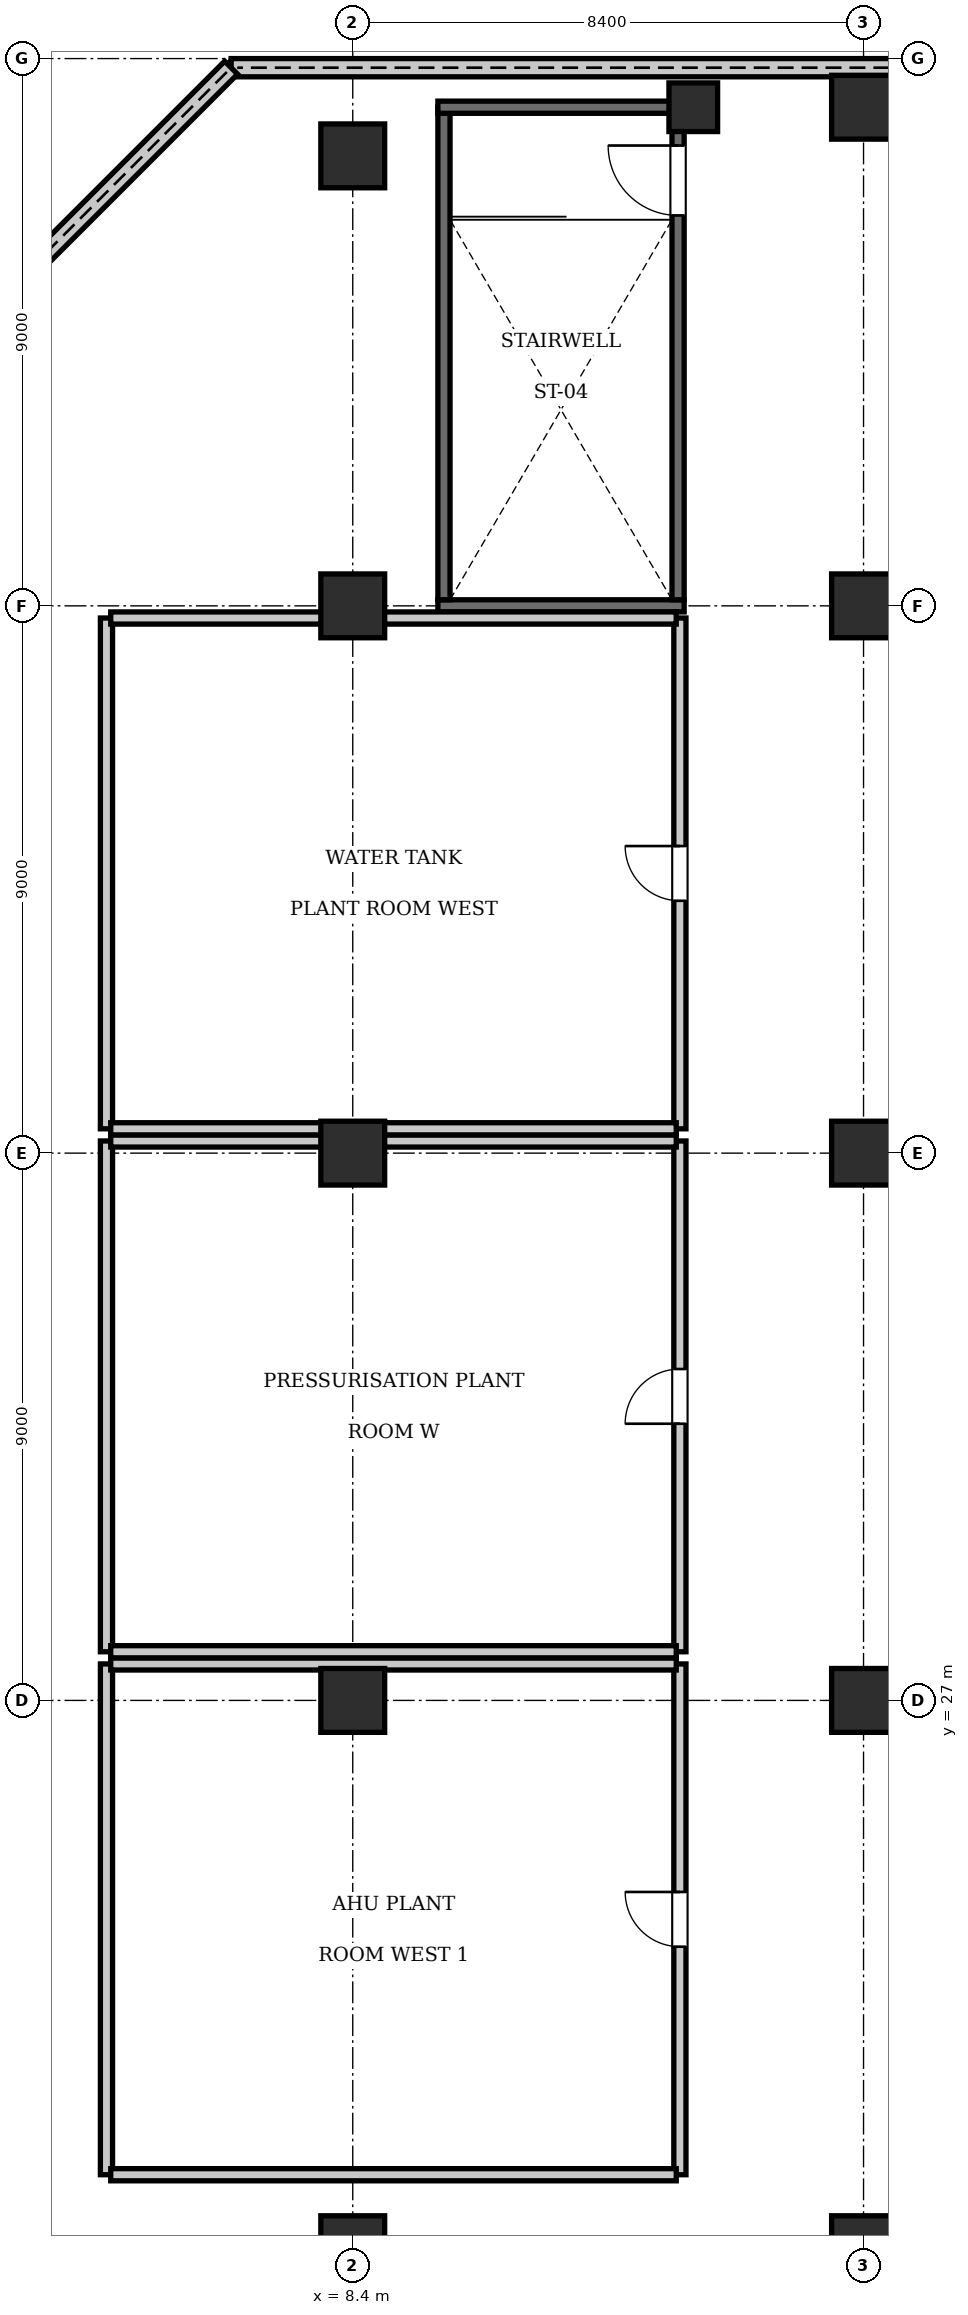
"""IFC4 building model, lengths in metres.
Left out: names, types, materials, properties, quantities, classifications, styles, units other than length and angle.
Written with IfcOpenShell. Run it as: python <this file> out.ifc"""

import sys

from ifc_helpers import new_model, si_unit, direction, frame, frame_2d, origin, origin_2d, place, context, subcontext, project, spatial, rectangle, extrude, element, fill, save


model = new_model("IFC4")
c1 = context("Model", 3, precision=1e-05, world=origin(), true_north=direction((0.0, 1.0)))
c2 = subcontext(c1, "Body", "Model", "MODEL_VIEW")
j1 = project(units=[si_unit("LENGTHUNIT", "METRE"), si_unit("PLANEANGLEUNIT", "RADIAN")], contexts=[c1])
p1 = place(None, origin())
s1 = spatial("IfcSite", under=j1, at=p1, CompositionType="ELEMENT")
p2 = place(p1, origin())
s2 = spatial("IfcBuilding", under=s1, at=p2, CompositionType="ELEMENT")
p3 = place(p2, frame((0.0, 0.0, 21.35)))
s3 = spatial("IfcBuildingStorey", under=s2, at=p3, CompositionType="ELEMENT", Elevation=21.35)
for number, where, z_axis, x_axis in (
    (1, (16.8, 18.0, 0.0), (0.0, 0.0, 1.0), (1.0, 0.0, 0.0)),
    (2, (16.8, 27.0, 0.0), (0.0, 0.0, 1.0), (1.0, 0.0, 0.0)),
    (3, (16.8, 36.0, 0.0), (0.0, 0.0, 1.0), (1.0, 0.0, 0.0)),
    (4, (16.8, 45.0, 0.0), (0.0, 0.0, 1.0), (1.0, 0.0, 0.0)),
    (5, (8.4, 18.0, 0.0), (0.0, 0.0, 1.0), (1.0, 0.0, 0.0)),
    (6, (8.4, 27.0, 0.0), (0.0, 0.0, 1.0), (1.0, 0.0, 0.0)),
    (7, (8.4, 36.0, 0.0), (0.0, 0.0, 1.0), (1.0, 0.0, 0.0)),
    (8, (8.4, 45.0, 0.0), (0.0, 0.0, 1.0), (1.0, 0.0, 0.0)),
    (9, (8.4, 52.4, 0.0), (0.0, 0.0, 1.0), (1.0, 0.0, 0.0)),
    (10, (16.8, 53.2, 0.0), (0.0, 0.0, 1.0), (1.0, 0.0, 0.0)),
):
    element("IfcColumn", number, at=place(p3, frame(where, z_axis=z_axis, x_axis=x_axis)), inside=s3, PredefinedType="COLUMN", context=c2, shape_type="SweptSolid", body=[
        extrude(rectangle(XDim=1.05, YDim=1.05, at=origin_2d()), origin(), (0.0, 0.0, 1.0), 5.6),
    ])
p4 = place(p3, frame((14.0, 53.2, 0.0), z_axis=(0.0, 0.0, 1.0), x_axis=(1.0, 0.0, 0.0)))
e11 = element("IfcColumn", 11, at=p4, inside=s3, PredefinedType="PILASTER", context=c2, shape_type="SweptSolid", body=[
    extrude(rectangle(XDim=0.8, YDim=0.8, at=origin_2d()), origin(), (0.0, 0.0, 1.0), 5.6),
])
p5 = place(p3, frame((9.8, 45.0, 0.0), z_axis=(0.0, 0.0, 1.0), x_axis=(1.0, 0.0, 0.0)))
e12 = element("IfcWall", 12, at=p5, inside=s3, PredefinedType="SOLIDWALL", context=c2, shape_type="SweptSolid", body=[
    extrude(rectangle(XDim=4.05, YDim=0.2, at=frame_2d((2.025, 0.0))), origin(), (0.0, 0.0, 1.0), 3.76),
])
p6 = place(p3, frame((9.9, 45.1, 0.0), z_axis=(0.0, 0.0, 1.0), x_axis=(0.0, 1.0, 0.0)))
e13 = element("IfcWall", 13, at=p6, inside=s3, PredefinedType="SOLIDWALL", context=c2, shape_type="SweptSolid", body=[
    extrude(rectangle(XDim=8.1, YDim=0.2, at=frame_2d((4.05, 0.0))), origin(), (0.0, 0.0, 1.0), 5.36),
])
p7 = place(p3, frame((13.75, 45.1, 0.0), z_axis=(0.0, 0.0, 1.0), x_axis=(0.0, 1.0, 0.0)))
e14 = element("IfcWall", 14, at=p7, inside=s3, PredefinedType="SOLIDWALL", context=c2, shape_type="SweptSolid", body=[
    extrude(rectangle(XDim=8.1, YDim=0.2, at=frame_2d((4.05, 0.0))), origin(), (0.0, 0.0, 1.0), 5.36),
])
p8 = place(p7, frame((6.32, 0.0, 0.0)))
e15 = element("IfcOpeningElement", 15, at=p8, cuts=e14, PredefinedType="OPENING", context=c2, shape_type="SweptSolid", body=[
    extrude(rectangle(XDim=1.15, YDim=2.15, at=frame_2d((0.575, 1.075))), frame((0.0, 0.11, 0.0), z_axis=(0.0, -1.0, 0.0), x_axis=(1.0, 0.0, 0.0)), (0.0, 0.0, 1.0), 0.22),
])
p9 = place(p3, frame((9.8, 53.2, 0.0), z_axis=(0.0, 0.0, 1.0), x_axis=(1.0, 0.0, 0.0)))
e16 = element("IfcWall", 16, at=p9, inside=s3, PredefinedType="SOLIDWALL", context=c2, shape_type="SweptSolid", body=[
    extrude(rectangle(XDim=4.05, YDim=0.2, at=frame_2d((2.025, 0.0))), origin(), (0.0, 0.0, 1.0), 5.36),
])
p10 = place(p3, frame((25.2, 53.85, 0.0), z_axis=(0.0, 0.0, 1.0), x_axis=(-1.0, 0.0, 0.0)))
e17 = element("IfcWall", 17, at=p10, inside=s3, PredefinedType="SOLIDWALL", context=c2, shape_type="SweptSolid", body=[
    extrude(rectangle(XDim=18.8, YDim=0.3, at=frame_2d((9.4, 0.0))), origin(), (0.0, 0.0, 1.0), 1.8),
])
p11 = place(p3, frame((6.4, 53.85, 0.0), z_axis=(0.0, 0.0, 1.0), x_axis=(-0.707106781187, -0.707106781187, 0.0)))
e18 = element("IfcWall", 18, at=p11, inside=s3, PredefinedType="SOLIDWALL", context=c2, shape_type="SweptSolid", body=[
    extrude(rectangle(XDim=8.839, YDim=0.3, at=frame_2d((4.419, 0.0))), origin(), (0.0, 0.0, 1.0), 1.8),
])
p12 = place(p3, frame((13.78, 19.2, 0.0), z_axis=(0.0, 0.0, 1.0), x_axis=(0.0, 1.0, 0.0)))
e19 = element("IfcWall", 19, at=p12, inside=s3, PredefinedType="PARTITIONING", context=c2, shape_type="SweptSolid", body=[
    extrude(rectangle(XDim=8.4, YDim=0.2, at=frame_2d((4.2, 0.0))), origin(), (0.0, 0.0, 1.0), 5.36),
])
p13 = place(p12, frame((3.75, 0.0, 0.0)))
e20 = element("IfcOpeningElement", 20, at=p13, cuts=e19, PredefinedType="OPENING", context=c2, shape_type="SweptSolid", body=[
    extrude(rectangle(XDim=0.9, YDim=2.1, at=frame_2d((0.45, 1.05))), frame((0.0, 0.11, 0.0), z_axis=(0.0, -1.0, 0.0), x_axis=(1.0, 0.0, 0.0)), (0.0, 0.0, 1.0), 0.22),
])
p14 = place(p3, frame((4.35, 19.2, 0.0), z_axis=(0.0, 0.0, 1.0), x_axis=(0.0, 1.0, 0.0)))
e21 = element("IfcWall", 21, at=p14, inside=s3, PredefinedType="PARTITIONING", context=c2, shape_type="SweptSolid", body=[
    extrude(rectangle(XDim=8.4, YDim=0.2, at=frame_2d((4.2, 0.0))), origin(), (0.0, 0.0, 1.0), 5.36),
])
for number, where, z_axis, x_axis in (
    (22, (4.42, 19.2, 0.0), (0.0, 0.0, 1.0), (1.0, 0.0, 0.0)),
    (23, (4.42, 27.6, 0.0), (0.0, 0.0, 1.0), (1.0, 0.0, 0.0)),
):
    element("IfcWall", number, at=place(p3, frame(where, z_axis=z_axis, x_axis=x_axis)), inside=s3, PredefinedType="PARTITIONING", context=c2, shape_type="SweptSolid", body=[
        extrude(rectangle(XDim=9.3, YDim=0.2, at=frame_2d((4.65, 0.0))), origin(), (0.0, 0.0, 1.0), 5.36),
    ])
p15 = place(p3, frame((13.78, 27.8, 0.0), z_axis=(0.0, 0.0, 1.0), x_axis=(0.0, 1.0, 0.0)))
e24 = element("IfcWall", 24, at=p15, inside=s3, PredefinedType="PARTITIONING", context=c2, shape_type="SweptSolid", body=[
    extrude(rectangle(XDim=8.4, YDim=0.2, at=frame_2d((4.2, 0.0))), origin(), (0.0, 0.0, 1.0), 5.36),
])
p16 = place(p15, frame((3.75, 0.0, 0.0)))
e25 = element("IfcOpeningElement", 25, at=p16, cuts=e24, PredefinedType="OPENING", context=c2, shape_type="SweptSolid", body=[
    extrude(rectangle(XDim=0.9, YDim=2.1, at=frame_2d((0.45, 1.05))), frame((0.0, 0.11, 0.0), z_axis=(0.0, -1.0, 0.0), x_axis=(1.0, 0.0, 0.0)), (0.0, 0.0, 1.0), 0.22),
])
p17 = place(p3, frame((4.35, 27.8, 0.0), z_axis=(0.0, 0.0, 1.0), x_axis=(0.0, 1.0, 0.0)))
e26 = element("IfcWall", 26, at=p17, inside=s3, PredefinedType="PARTITIONING", context=c2, shape_type="SweptSolid", body=[
    extrude(rectangle(XDim=8.4, YDim=0.2, at=frame_2d((4.2, 0.0))), origin(), (0.0, 0.0, 1.0), 5.36),
])
p18 = place(p3, frame((4.42, 27.8, 0.0), z_axis=(0.0, 0.0, 1.0), x_axis=(1.0, 0.0, 0.0)))
e27 = element("IfcWall", 27, at=p18, inside=s3, PredefinedType="PARTITIONING", context=c2, shape_type="SweptSolid", body=[
    extrude(rectangle(XDim=9.3, YDim=0.2, at=frame_2d((4.65, 0.0))), origin(), (0.0, 0.0, 1.0), 5.36),
])
p19 = place(p3, frame((4.42, 36.2, 0.0), z_axis=(0.0, 0.0, 1.0), x_axis=(1.0, 0.0, 0.0)))
e28 = element("IfcWall", 28, at=p19, inside=s3, PredefinedType="PARTITIONING", context=c2, shape_type="SweptSolid", body=[
    extrude(rectangle(XDim=9.3, YDim=0.2, at=frame_2d((4.65, 0.0))), origin(), (0.0, 0.0, 1.0), 3.76),
])
p20 = place(p3, frame((13.78, 36.4, 0.0), z_axis=(0.0, 0.0, 1.0), x_axis=(0.0, 1.0, 0.0)))
e29 = element("IfcWall", 29, at=p20, inside=s3, PredefinedType="PARTITIONING", context=c2, shape_type="SweptSolid", body=[
    extrude(rectangle(XDim=8.4, YDim=0.2, at=frame_2d((4.2, 0.0))), origin(), (0.0, 0.0, 1.0), 5.36),
])
p21 = place(p20, frame((3.75, 0.0, 0.0)))
e30 = element("IfcOpeningElement", 30, at=p21, cuts=e29, PredefinedType="OPENING", context=c2, shape_type="SweptSolid", body=[
    extrude(rectangle(XDim=0.9, YDim=2.1, at=frame_2d((0.45, 1.05))), frame((0.0, 0.11, 0.0), z_axis=(0.0, -1.0, 0.0), x_axis=(1.0, 0.0, 0.0)), (0.0, 0.0, 1.0), 0.22),
])
p22 = place(p3, frame((4.35, 36.4, 0.0), z_axis=(0.0, 0.0, 1.0), x_axis=(0.0, 1.0, 0.0)))
e31 = element("IfcWall", 31, at=p22, inside=s3, PredefinedType="PARTITIONING", context=c2, shape_type="SweptSolid", body=[
    extrude(rectangle(XDim=8.4, YDim=0.2, at=frame_2d((4.2, 0.0))), origin(), (0.0, 0.0, 1.0), 5.36),
])
p23 = place(p3, frame((4.42, 36.4, 0.0), z_axis=(0.0, 0.0, 1.0), x_axis=(1.0, 0.0, 0.0)))
e32 = element("IfcWall", 32, at=p23, inside=s3, PredefinedType="PARTITIONING", context=c2, shape_type="SweptSolid", body=[
    extrude(rectangle(XDim=9.3, YDim=0.2, at=frame_2d((4.65, 0.0))), origin(), (0.0, 0.0, 1.0), 5.36),
])
p24 = place(p3, frame((4.42, 44.8, 0.0), z_axis=(0.0, 0.0, 1.0), x_axis=(1.0, 0.0, 0.0)))
e33 = element("IfcWall", 33, at=p24, inside=s3, PredefinedType="PARTITIONING", context=c2, shape_type="SweptSolid", body=[
    extrude(rectangle(XDim=9.3, YDim=0.2, at=frame_2d((4.65, 0.0))), origin(), (0.0, 0.0, 1.0), 3.76),
])
p25 = place(p8, origin())
e34 = element("IfcDoor", 34, at=p25, inside=s3, OperationType="SINGLE_SWING_RIGHT", PredefinedType="DOOR", context=c2, shape_type="SweptSolid", body=[
    extrude(rectangle(XDim=1.15, YDim=2.15, at=frame_2d((0.575, 1.075))), frame((0.0, 0.025, 0.0), z_axis=(0.0, -1.0, 0.0), x_axis=(1.0, 0.0, 0.0)), (0.0, 0.0, 1.0), 0.05),
])
fill(e15, e34)
p26 = place(p13, origin())
e35 = element("IfcDoor", 35, at=p26, inside=s3, OperationType="SINGLE_SWING_RIGHT", PredefinedType="DOOR", context=c2, shape_type="SweptSolid", body=[
    extrude(rectangle(XDim=0.9, YDim=2.1, at=frame_2d((0.45, 1.05))), frame((0.0, 0.025, 0.0), z_axis=(0.0, -1.0, 0.0), x_axis=(1.0, 0.0, 0.0)), (0.0, 0.0, 1.0), 0.05),
])
fill(e20, e35)
p27 = place(p16, origin())
e36 = element("IfcDoor", 36, at=p27, inside=s3, OperationType="SINGLE_SWING_LEFT", PredefinedType="DOOR", context=c2, shape_type="SweptSolid", body=[
    extrude(rectangle(XDim=0.9, YDim=2.1, at=frame_2d((0.45, 1.05))), frame((0.0, 0.025, 0.0), z_axis=(0.0, -1.0, 0.0), x_axis=(1.0, 0.0, 0.0)), (0.0, 0.0, 1.0), 0.05),
])
fill(e25, e36)
p28 = place(p21, origin())
e37 = element("IfcDoor", 37, at=p28, inside=s3, OperationType="SINGLE_SWING_RIGHT", PredefinedType="DOOR", context=c2, shape_type="SweptSolid", body=[
    extrude(rectangle(XDim=0.9, YDim=2.1, at=frame_2d((0.45, 1.05))), frame((0.0, 0.025, 0.0), z_axis=(0.0, -1.0, 0.0), x_axis=(1.0, 0.0, 0.0)), (0.0, 0.0, 1.0), 0.05),
])
fill(e30, e37)
save(model, sys.argv[1])
